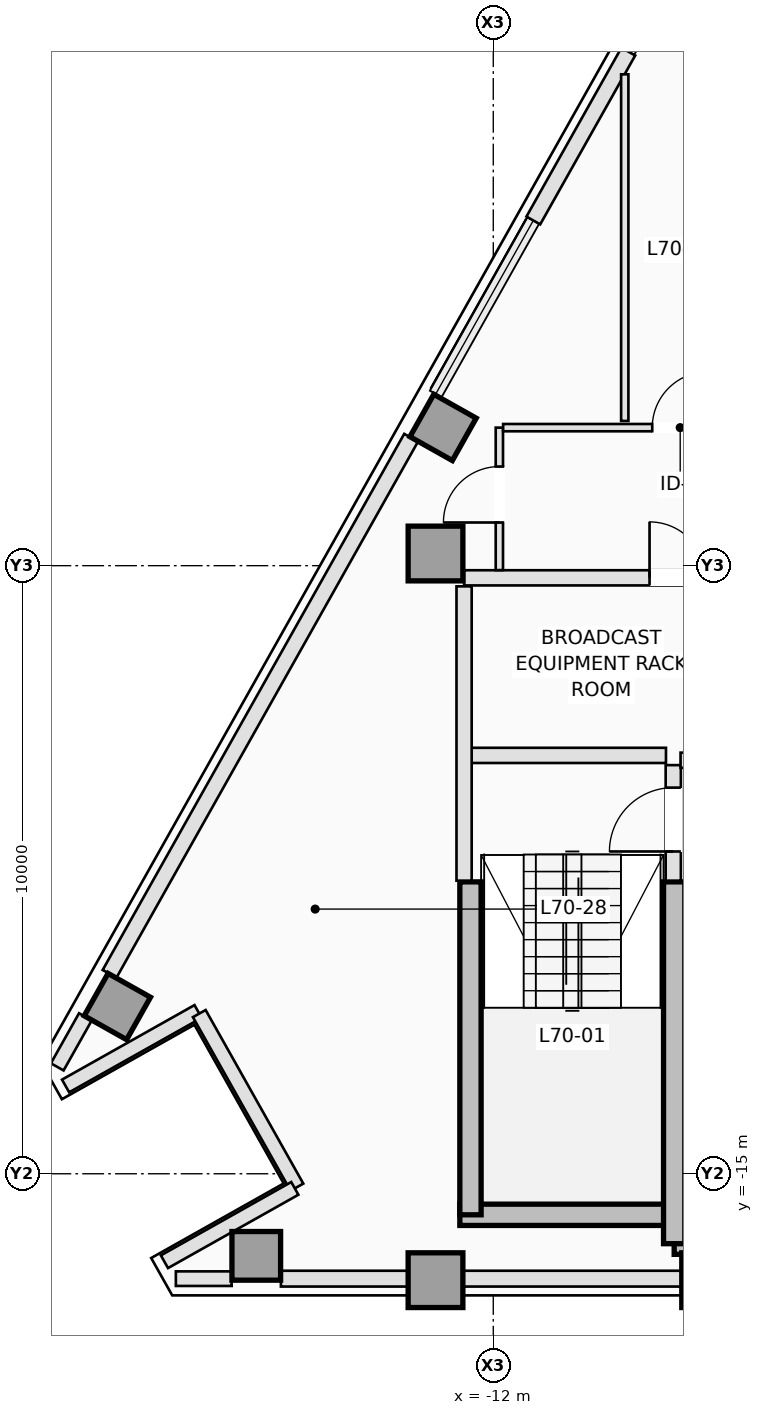
"""IFC4 building model, lengths in metres.
Left out: names, types, materials, properties, quantities, classifications, styles, units other than length and angle.
Written with IfcOpenShell. Run it as: python <this file> out.ifc"""

import sys

from ifc_helpers import new_model, si_unit, direction, frame, frame_2d, origin, origin_2d, place, context, subcontext, project, spatial, rectangle, extrude, element, fill, save


model = new_model("IFC4")
c1 = context("Model", 3, precision=1e-05, world=origin(), true_north=direction((0.0, 1.0)))
c2 = subcontext(c1, "Body", "Model", "MODEL_VIEW")
j1 = project(units=[si_unit("LENGTHUNIT", "METRE"), si_unit("PLANEANGLEUNIT", "RADIAN")], contexts=[c1])
p1 = place(None, origin())
s1 = spatial("IfcSite", under=j1, at=p1, CompositionType="ELEMENT")
p2 = place(p1, origin())
s2 = spatial("IfcBuilding", under=s1, at=p2, CompositionType="ELEMENT")
p3 = place(p2, frame((0.0, 0.0, 253.4)))
s3 = spatial("IfcBuildingStorey", under=s2, at=p3, CompositionType="ELEMENT", Elevation=253.4)
p4 = place(p3, frame((-12.55, -15.675, 0.0), z_axis=(0.0, 0.0, 1.0), x_axis=(1.0, 0.0, 0.0)))
e1 = element("IfcWall", 1, at=p4, inside=s3, PredefinedType="SHEAR", context=c2, shape_type="SweptSolid", body=[
    extrude(rectangle(XDim=3.7, YDim=0.35, at=frame_2d((1.85, 0.0))), origin(), (0.0, 0.0, 1.0), 3.5),
])
p5 = place(p3, frame((-9.025, -16.15, 0.0), z_axis=(0.0, 0.0, 1.0), x_axis=(1.0, 0.0, 0.0)))
e2 = element("IfcWall", 2, at=p5, inside=s3, PredefinedType="SHEAR", context=c2, shape_type="SweptSolid", body=[
    extrude(rectangle(XDim=5.275, YDim=0.35, at=frame_2d((2.637, 0.0))), origin(), (0.0, 0.0, 1.0), 3.5),
])
p6 = place(p3, frame((-12.375, -15.675, 0.0), z_axis=(0.0, 0.0, 1.0), x_axis=(0.0, 1.0, 0.0)))
e3 = element("IfcWall", 3, at=p6, inside=s3, PredefinedType="SHEAR", context=c2, shape_type="SweptSolid", body=[
    extrude(rectangle(XDim=5.475, YDim=0.35, at=frame_2d((2.738, 0.0))), origin(), (0.0, 0.0, 1.0), 3.5),
])
p7 = place(p3, frame((-9.025, -16.15, 0.0), z_axis=(0.0, 0.0, 1.0), x_axis=(0.0, 1.0, 0.0)))
e4 = element("IfcWall", 4, at=p7, inside=s3, PredefinedType="SHEAR", context=c2, shape_type="SweptSolid", body=[
    extrude(rectangle(XDim=5.95, YDim=0.35, at=frame_2d((2.975, 0.0))), origin(), (0.0, 0.0, 1.0), 3.5),
])
for number, where, z_axis, x_axis in (
    (5, (-12.95, -16.75, 0.0), (0.0, 0.0, 1.0), (1.0, 0.0, 0.0)),
    (6, (-8.45, -16.75, 0.0), (0.0, 0.0, 1.0), (1.0, 0.0, 0.0)),
    (7, (-12.95, -4.8, 0.0), (0.0, 0.0, 1.0), (1.0, 0.0, 0.0)),
):
    element("IfcColumn", number, at=place(p3, frame(where, z_axis=z_axis, x_axis=x_axis)), inside=s3, PredefinedType="COLUMN", context=c2, shape_type="SweptSolid", body=[
        extrude(rectangle(XDim=0.9, YDim=0.9, at=origin_2d()), origin(), (0.0, 0.0, 1.0), 3.5),
    ])
for number, where, z_axis, x_axis in (
    (8, (-15.898, -16.35, 0.0), (0.0, 0.0, 1.0), (0.0, 1.0, 0.0)),
    (9, (-12.825, -2.727, 0.0), (0.0, 0.0, 1.0), (-0.872, 0.49, 0.0)),
    (10, (-18.182, -12.25, 0.0), (0.0, 0.0, 1.0), (-0.872, 0.49, 0.0)),
):
    element("IfcColumn", number, at=place(p3, frame(where, z_axis=z_axis, x_axis=x_axis)), inside=s3, PredefinedType="COLUMN", context=c2, shape_type="SweptSolid", body=[
        extrude(rectangle(XDim=0.8, YDim=0.8, at=origin_2d()), origin(), (0.0, 0.0, 1.0), 3.5),
    ])
p8 = place(p3, frame((-16.302, -16.725, 0.0), z_axis=(0.0, 0.0, 1.0), x_axis=(-1.0, 0.0, 0.0)))
e11 = element("IfcWall", 11, at=p8, inside=s3, PredefinedType="STANDARD", context=c2, shape_type="SweptSolid", body=[
    extrude(rectangle(XDim=0.917, YDim=0.24, at=frame_2d((0.459, 0.0))), origin(), (0.0, 0.0, 1.0), 3.25),
])
p9 = place(p3, frame((-4.22, -16.725, 0.0), z_axis=(0.0, 0.0, 1.0), x_axis=(-1.0, 0.0, 0.0)))
e12 = element("IfcWall", 12, at=p9, inside=s3, PredefinedType="STANDARD", context=c2, shape_type="SweptSolid", body=[
    extrude(rectangle(XDim=11.273, YDim=0.26, at=frame_2d((5.636, 0.0))), origin(), (0.0, 0.0, 1.0), 2.79),
])
p10 = place(p3, frame((-19.171, -13.242, 0.0), z_axis=(0.0, 0.0, 1.0), x_axis=(0.490199895283, 0.871610040479, 0.0)))
e13 = element("IfcWall", 13, at=p10, inside=s3, PredefinedType="STANDARD", context=c2, shape_type="SweptSolid", body=[
    extrude(rectangle(XDim=0.945, YDim=0.24, at=frame_2d((0.472, 0.0))), origin(), (0.0, 0.0, 1.0), 3.25),
])
p11 = place(p3, frame((-18.311, -11.713, 0.0), z_axis=(0.0, 0.0, 1.0), x_axis=(0.490266968583, 0.871572314565, 0.0)))
e14 = element("IfcWall", 14, at=p11, inside=s3, PredefinedType="STANDARD", context=c2, shape_type="SweptSolid", body=[
    extrude(rectangle(XDim=10.116, YDim=0.26, at=frame_2d((5.058, 0.0))), origin(), (0.0, 0.0, 1.0), 3.25),
])
p12 = place(p3, frame((-11.341, 0.677, 0.0), z_axis=(0.0, 0.0, 1.0), x_axis=(0.490268515903, 0.871571444182, 0.0)))
e15 = element("IfcWall", 15, at=p12, inside=s3, PredefinedType="STANDARD", context=c2, shape_type="SweptSolid", body=[
    extrude(rectangle(XDim=3.186, YDim=0.26, at=frame_2d((1.593, 0.0))), origin(), (0.0, 0.0, 1.0), 3.25),
])
p13 = place(p3, frame((-19.033, -13.556, 0.0), z_axis=(0.0, 0.0, 1.0), x_axis=(0.871588577066, 0.490238056792, 0.0)))
e16 = element("IfcWall", 16, at=p13, inside=s3, PredefinedType="STANDARD", context=c2, shape_type="SweptSolid", body=[
    extrude(rectangle(XDim=2.5, YDim=0.24, at=frame_2d((1.25, 0.0))), origin(), (0.0, 0.0, 1.0), 3.25),
])
p14 = place(p3, frame((-16.835, -12.366, 0.0), z_axis=(0.0, 0.0, 1.0), x_axis=(0.490293083368, -0.871557624258, 0.0)))
e17 = element("IfcWall", 17, at=p14, inside=s3, PredefinedType="STANDARD", context=c2, shape_type="SweptSolid", body=[
    extrude(rectangle(XDim=3.276, YDim=0.24, at=frame_2d((1.638, 0.0))), origin(), (0.0, 0.0, 1.0), 2.79),
])
p15 = place(p3, frame((-15.264, -15.24, 0.0), z_axis=(0.0, 0.0, 1.0), x_axis=(-0.87157023615, -0.490270663468, 0.0)))
e18 = element("IfcWall", 18, at=p15, inside=s3, PredefinedType="STANDARD", context=c2, shape_type="SweptSolid", body=[
    extrude(rectangle(XDim=2.46, YDim=0.24, at=frame_2d((1.23, 0.0))), origin(), (0.0, 0.0, 1.0), 3.25),
])
p16 = place(p3, frame((-9.04, -10.18, 0.0), z_axis=(0.0, 0.0, 1.0), x_axis=(0.0, 1.0, 0.0)))
e19 = element("IfcWall", 19, at=p16, inside=s3, PredefinedType="PARTITIONING", context=c2, shape_type="SweptSolid", body=[
    extrude(rectangle(XDim=1.9, YDim=0.25, at=frame_2d((0.95, 0.0))), origin(), (0.0, 0.0, 1.0), 3.25),
])
p17 = place(p16, frame((0.48, 0.0, 0.0)))
e20 = element("IfcOpeningElement", 20, at=p17, cuts=e19, PredefinedType="OPENING", context=c2, shape_type="SweptSolid", body=[
    extrude(rectangle(XDim=1.05, YDim=2.15, at=frame_2d((0.525, 1.075))), frame((0.0, 0.135, 0.0), z_axis=(0.0, -1.0, 0.0), x_axis=(1.0, 0.0, 0.0)), (0.0, 0.0, 1.0), 0.27),
])
p18 = place(p3, frame((-12.38, -8.12, 0.0), z_axis=(0.0, 0.0, 1.0), x_axis=(1.0, 0.0, 0.0)))
e21 = element("IfcWall", 21, at=p18, inside=s3, PredefinedType="PARTITIONING", context=c2, shape_type="SweptSolid", body=[
    extrude(rectangle(XDim=3.22, YDim=0.25, at=frame_2d((1.61, 0.0))), origin(), (0.0, 0.0, 1.0), 3.25),
])
p19 = place(p3, frame((-12.48, -10.18, 0.0), z_axis=(0.0, 0.0, 1.0), x_axis=(0.0, 1.0, 0.0)))
e22 = element("IfcWall", 22, at=p19, inside=s3, PredefinedType="PARTITIONING", context=c2, shape_type="SweptSolid", body=[
    extrude(rectangle(XDim=4.84, YDim=0.25, at=frame_2d((2.42, 0.0))), origin(), (0.0, 0.0, 1.0), 3.25),
])
p20 = place(p3, frame((-8.92, -8.2, 0.0), z_axis=(0.0, 0.0, 1.0), x_axis=(1.0, 0.0, 0.0)))
e23 = element("IfcWall", 23, at=p20, inside=s3, PredefinedType="PARTITIONING", context=c2, shape_type="SweptSolid", body=[
    extrude(rectangle(XDim=5.24, YDim=0.25, at=frame_2d((2.62, 0.0))), origin(), (0.0, 0.0, 1.0), 3.25),
])
p21 = place(p3, frame((-12.48, -5.2, 0.0), z_axis=(0.0, 0.0, 1.0), x_axis=(1.0, 0.0, 0.0)))
e24 = element("IfcWall", 24, at=p21, inside=s3, PredefinedType="PARTITIONING", context=c2, shape_type="SweptSolid", body=[
    extrude(rectangle(XDim=8.278, YDim=0.25, at=frame_2d((4.139, 0.0))), origin(), (0.0, 0.0, 1.0), 3.25),
])
p22 = place(p21, frame((3.05, 0.0, 0.0)))
e25 = element("IfcOpeningElement", 25, at=p22, cuts=e24, PredefinedType="OPENING", context=c2, shape_type="SweptSolid", body=[
    extrude(rectangle(XDim=0.92, YDim=2.12, at=frame_2d((0.46, 1.06))), frame((0.0, 0.135, 0.0), z_axis=(0.0, -1.0, 0.0), x_axis=(1.0, 0.0, 0.0)), (0.0, 0.0, 1.0), 0.27),
])
p23 = place(p21, frame((6.15, 0.0, 0.0)))
e26 = element("IfcOpeningElement", 26, at=p23, cuts=e24, PredefinedType="OPENING", context=c2, shape_type="SweptSolid", body=[
    extrude(rectangle(XDim=0.92, YDim=2.12, at=frame_2d((0.46, 1.06))), frame((0.0, 0.135, 0.0), z_axis=(0.0, -1.0, 0.0), x_axis=(1.0, 0.0, 0.0)), (0.0, 0.0, 1.0), 0.27),
])
p24 = place(p3, frame((-11.9, -5.073, 0.0), z_axis=(0.0, 0.0, 1.0), x_axis=(0.0, 1.0, 0.0)))
e27 = element("IfcWall", 27, at=p24, inside=s3, PredefinedType="PARTITIONING", context=c2, shape_type="SweptSolid", body=[
    extrude(rectangle(XDim=2.343, YDim=0.12, at=frame_2d((1.171, 0.0))), origin(), (0.0, 0.0, 1.0), 3.25),
])
p25 = place(p24, frame((0.783, 0.0, 0.0)))
e28 = element("IfcOpeningElement", 28, at=p25, cuts=e27, PredefinedType="OPENING", context=c2, shape_type="SweptSolid", body=[
    extrude(rectangle(XDim=0.92, YDim=2.12, at=frame_2d((0.46, 1.06))), frame((0.0, 0.07, 0.0), z_axis=(0.0, -1.0, 0.0), x_axis=(1.0, 0.0, 0.0)), (0.0, 0.0, 1.0), 0.14),
])
p26 = place(p3, frame((-11.838, -2.73, 0.0), z_axis=(0.0, 0.0, 1.0), x_axis=(1.0, 0.0, 0.0)))
e29 = element("IfcWall", 29, at=p26, inside=s3, PredefinedType="PARTITIONING", context=c2, shape_type="SweptSolid", body=[
    extrude(rectangle(XDim=7.616, YDim=0.12, at=frame_2d((3.808, 0.0))), origin(), (0.0, 0.0, 1.0), 3.25),
])
p27 = place(p26, frame((2.452, 0.0, 0.0)))
e30 = element("IfcOpeningElement", 30, at=p27, cuts=e29, PredefinedType="OPENING", context=c2, shape_type="SweptSolid", body=[
    extrude(rectangle(XDim=0.92, YDim=2.12, at=frame_2d((0.46, 1.06))), frame((0.0, 0.07, 0.0), z_axis=(0.0, -1.0, 0.0), x_axis=(1.0, 0.0, 0.0)), (0.0, 0.0, 1.0), 0.14),
])
p28 = place(p26, frame((5.156, 0.0, 0.0)))
e31 = element("IfcOpeningElement", 31, at=p28, cuts=e29, PredefinedType="OPENING", context=c2, shape_type="SweptSolid", body=[
    extrude(rectangle(XDim=0.92, YDim=2.12, at=frame_2d((0.46, 1.06))), frame((0.0, 0.07, 0.0), z_axis=(0.0, -1.0, 0.0), x_axis=(1.0, 0.0, 0.0)), (0.0, 0.0, 1.0), 0.14),
])
p29 = place(p3, frame((-9.838, -2.62, 0.0), z_axis=(0.0, 0.0, 1.0), x_axis=(0.0, 1.0, 0.0)))
e32 = element("IfcWall", 32, at=p29, inside=s3, PredefinedType="PARTITIONING", context=c2, shape_type="SweptSolid", body=[
    extrude(rectangle(XDim=5.7, YDim=0.12, at=frame_2d((2.85, 0.0))), origin(), (0.0, 0.0, 1.0), 3.25),
])
p30 = place(p17, origin())
e33 = element("IfcDoor", 33, at=p30, inside=s3, OperationType="SINGLE_SWING_LEFT", PredefinedType="DOOR", context=c2, shape_type="SweptSolid", body=[
    extrude(rectangle(XDim=1.05, YDim=2.15, at=frame_2d((0.525, 1.075))), frame((0.0, 0.025, 0.0), z_axis=(0.0, -1.0, 0.0), x_axis=(1.0, 0.0, 0.0)), (0.0, 0.0, 1.0), 0.05),
])
fill(e20, e33)
p31 = place(p22, origin())
e34 = element("IfcDoor", 34, at=p31, inside=s3, OperationType="SINGLE_SWING_LEFT", PredefinedType="DOOR", context=c2, shape_type="SweptSolid", body=[
    extrude(rectangle(XDim=0.92, YDim=2.12, at=frame_2d((0.46, 1.06))), frame((0.0, 0.025, 0.0), z_axis=(0.0, -1.0, 0.0), x_axis=(1.0, 0.0, 0.0)), (0.0, 0.0, 1.0), 0.05),
])
fill(e25, e34)
p32 = place(p27, origin())
e35 = element("IfcDoor", 35, at=p32, inside=s3, OperationType="SINGLE_SWING_RIGHT", PredefinedType="DOOR", context=c2, shape_type="SweptSolid", body=[
    extrude(rectangle(XDim=0.92, YDim=2.12, at=frame_2d((0.46, 1.06))), frame((0.0, 0.025, 0.0), z_axis=(0.0, -1.0, 0.0), x_axis=(1.0, 0.0, 0.0)), (0.0, 0.0, 1.0), 0.05),
])
fill(e30, e35)
p33 = place(p25, origin())
e36 = element("IfcDoor", 36, at=p33, inside=s3, OperationType="SINGLE_SWING_LEFT", PredefinedType="DOOR", context=c2, shape_type="SweptSolid", body=[
    extrude(rectangle(XDim=0.92, YDim=2.12, at=frame_2d((0.46, 1.06))), frame((0.0, 0.025, 0.0), z_axis=(0.0, -1.0, 0.0), x_axis=(1.0, 0.0, 0.0)), (0.0, 0.0, 1.0), 0.05),
])
fill(e28, e36)
save(model, sys.argv[1])
